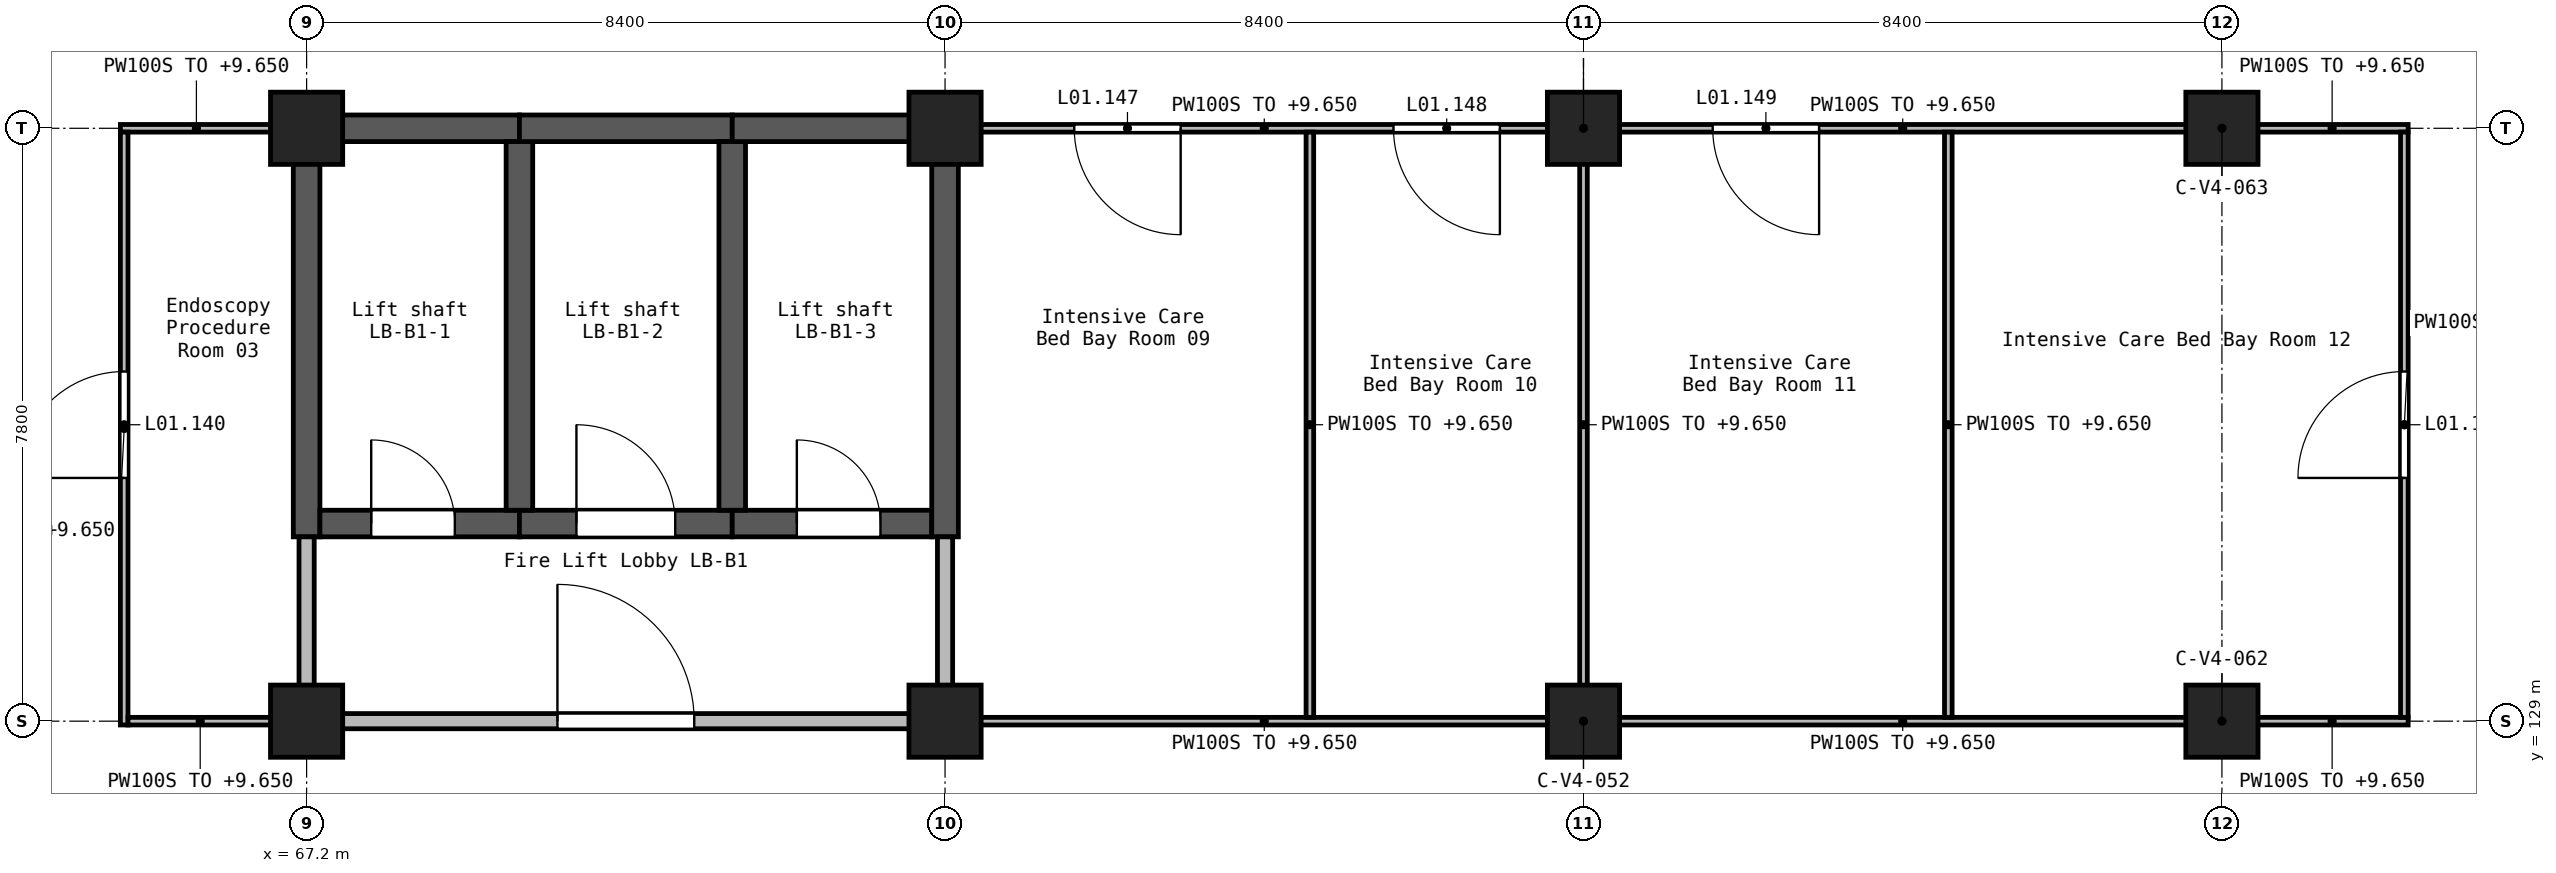
"""IFC4 building model, lengths in metres.
Left out: names, types, materials, properties, quantities, classifications, styles, units other than length and angle.
Written with IfcOpenShell. Run it as: python <this file> out.ifc"""

import sys

from ifc_helpers import new_model, si_unit, direction, frame, frame_2d, origin, origin_2d, place, context, subcontext, project, spatial, rectangle, extrude, element, fill, save


model = new_model("IFC4")
c1 = context("Model", 3, precision=1e-05, world=origin(), true_north=direction((0.0, 1.0)))
c2 = subcontext(c1, "Body", "Model", "MODEL_VIEW")
j1 = project(units=[si_unit("LENGTHUNIT", "METRE"), si_unit("PLANEANGLEUNIT", "RADIAN")], contexts=[c1])
p1 = place(None, origin())
s1 = spatial("IfcSite", under=j1, at=p1, CompositionType="ELEMENT")
p2 = place(p1, origin())
s2 = spatial("IfcBuilding", under=s1, at=p2, CompositionType="ELEMENT")
p3 = place(p2, frame((0.0, 0.0, 5.4)))
s3 = spatial("IfcBuildingStorey", under=s2, at=p3, CompositionType="ELEMENT", Elevation=5.4)
for number, where, z_axis, x_axis in (
    (1, (67.2, 129.0, 0.0), (0.0, 0.0, 1.0), (1.0, 0.0, 0.0)),
    (2, (67.2, 136.8, 0.0), (0.0, 0.0, 1.0), (1.0, 0.0, 0.0)),
    (3, (75.6, 129.0, 0.0), (0.0, 0.0, 1.0), (1.0, 0.0, 0.0)),
    (4, (75.6, 136.8, 0.0), (0.0, 0.0, 1.0), (1.0, 0.0, 0.0)),
    (5, (84.0, 129.0, 0.0), (0.0, 0.0, 1.0), (1.0, 0.0, 0.0)),
    (6, (84.0, 136.8, 0.0), (0.0, 0.0, 1.0), (1.0, 0.0, 0.0)),
    (7, (92.4, 129.0, 0.0), (0.0, 0.0, 1.0), (1.0, 0.0, 0.0)),
    (8, (92.4, 136.8, 0.0), (0.0, 0.0, 1.0), (1.0, 0.0, 0.0)),
):
    element("IfcColumn", number, at=place(p3, frame(where, z_axis=z_axis, x_axis=x_axis)), inside=s3, PredefinedType="COLUMN", context=c2, shape_type="SweptSolid", body=[
        extrude(rectangle(XDim=0.95, YDim=0.95, at=origin_2d()), origin(), (0.0, 0.0, 1.0), 4.5),
    ])
p4 = place(p3, frame((67.025, 136.8, 0.0), z_axis=(0.0, 0.0, 1.0), x_axis=(1.0, 0.0, 0.0)))
e9 = element("IfcWall", 9, at=p4, inside=s3, PredefinedType="SHEAR", context=c2, shape_type="SweptSolid", body=[
    extrude(rectangle(XDim=2.975, YDim=0.35, at=frame_2d((1.488, 0.0))), origin(), (0.0, 0.0, 1.0), 4.5),
])
p5 = place(p3, frame((67.2, 131.425, 0.0), z_axis=(0.0, 0.0, 1.0), x_axis=(0.0, 1.0, 0.0)))
e10 = element("IfcWall", 10, at=p5, inside=s3, PredefinedType="SHEAR", context=c2, shape_type="SweptSolid", body=[
    extrude(rectangle(XDim=5.2, YDim=0.35, at=frame_2d((2.6, 0.0))), origin(), (0.0, 0.0, 1.0), 4.5),
])
p6 = place(p3, frame((67.375, 131.6, 0.0), z_axis=(0.0, 0.0, 1.0), x_axis=(1.0, 0.0, 0.0)))
e11 = element("IfcWall", 11, at=p6, inside=s3, PredefinedType="SHEAR", context=c2, shape_type="SweptSolid", body=[
    extrude(rectangle(XDim=2.625, YDim=0.35, at=frame_2d((1.312, 0.0))), origin(), (0.0, 0.0, 1.0), 4.5),
])
p7 = place(p6, frame((0.675, 0.0, 0.0)))
e12 = element("IfcOpeningElement", 12, at=p7, cuts=e11, PredefinedType="OPENING", context=c2, shape_type="SweptSolid", body=[
    extrude(rectangle(XDim=1.1, YDim=2.1, at=frame_2d((0.55, 1.05))), frame((0.0, 0.185, 0.0), z_axis=(0.0, -1.0, 0.0), x_axis=(1.0, 0.0, 0.0)), (0.0, 0.0, 1.0), 0.37),
])
p8 = place(p3, frame((70.0, 131.6, 0.0), z_axis=(0.0, 0.0, 1.0), x_axis=(1.0, 0.0, 0.0)))
e13 = element("IfcWall", 13, at=p8, inside=s3, PredefinedType="SHEAR", context=c2, shape_type="SweptSolid", body=[
    extrude(rectangle(XDim=2.8, YDim=0.35, at=frame_2d((1.4, 0.0))), origin(), (0.0, 0.0, 1.0), 4.5),
])
p9 = place(p8, frame((0.75, 0.0, 0.0)))
e14 = element("IfcOpeningElement", 14, at=p9, cuts=e13, PredefinedType="OPENING", context=c2, shape_type="SweptSolid", body=[
    extrude(rectangle(XDim=1.3, YDim=2.1, at=frame_2d((0.65, 1.05))), frame((0.0, 0.185, 0.0), z_axis=(0.0, -1.0, 0.0), x_axis=(1.0, 0.0, 0.0)), (0.0, 0.0, 1.0), 0.37),
])
p10 = place(p3, frame((70.0, 131.775, 0.0), z_axis=(0.0, 0.0, 1.0), x_axis=(0.0, 1.0, 0.0)))
e15 = element("IfcWall", 15, at=p10, inside=s3, PredefinedType="SHEAR", context=c2, shape_type="SweptSolid", body=[
    extrude(rectangle(XDim=4.85, YDim=0.35, at=frame_2d((2.425, 0.0))), origin(), (0.0, 0.0, 1.0), 4.5),
])
p11 = place(p3, frame((70.0, 136.8, 0.0), z_axis=(0.0, 0.0, 1.0), x_axis=(1.0, 0.0, 0.0)))
e16 = element("IfcWall", 16, at=p11, inside=s3, PredefinedType="SHEAR", context=c2, shape_type="SweptSolid", body=[
    extrude(rectangle(XDim=2.8, YDim=0.35, at=frame_2d((1.4, 0.0))), origin(), (0.0, 0.0, 1.0), 4.5),
])
p12 = place(p3, frame((72.8, 131.6, 0.0), z_axis=(0.0, 0.0, 1.0), x_axis=(1.0, 0.0, 0.0)))
e17 = element("IfcWall", 17, at=p12, inside=s3, PredefinedType="SHEAR", context=c2, shape_type="SweptSolid", body=[
    extrude(rectangle(XDim=2.625, YDim=0.35, at=frame_2d((1.312, 0.0))), origin(), (0.0, 0.0, 1.0), 4.5),
])
p13 = place(p12, frame((0.85, 0.0, 0.0)))
e18 = element("IfcOpeningElement", 18, at=p13, cuts=e17, PredefinedType="OPENING", context=c2, shape_type="SweptSolid", body=[
    extrude(rectangle(XDim=1.1, YDim=2.1, at=frame_2d((0.55, 1.05))), frame((0.0, 0.185, 0.0), z_axis=(0.0, -1.0, 0.0), x_axis=(1.0, 0.0, 0.0)), (0.0, 0.0, 1.0), 0.37),
])
p14 = place(p3, frame((72.8, 131.775, 0.0), z_axis=(0.0, 0.0, 1.0), x_axis=(0.0, 1.0, 0.0)))
e19 = element("IfcWall", 19, at=p14, inside=s3, PredefinedType="SHEAR", context=c2, shape_type="SweptSolid", body=[
    extrude(rectangle(XDim=4.85, YDim=0.35, at=frame_2d((2.425, 0.0))), origin(), (0.0, 0.0, 1.0), 4.5),
])
p15 = place(p3, frame((72.8, 136.8, 0.0), z_axis=(0.0, 0.0, 1.0), x_axis=(1.0, 0.0, 0.0)))
e20 = element("IfcWall", 20, at=p15, inside=s3, PredefinedType="SHEAR", context=c2, shape_type="SweptSolid", body=[
    extrude(rectangle(XDim=2.625, YDim=0.35, at=frame_2d((1.312, 0.0))), origin(), (0.0, 0.0, 1.0), 4.5),
])
p16 = place(p3, frame((75.6, 131.425, 0.0), z_axis=(0.0, 0.0, 1.0), x_axis=(0.0, 1.0, 0.0)))
e21 = element("IfcWall", 21, at=p16, inside=s3, PredefinedType="SHEAR", context=c2, shape_type="SweptSolid", body=[
    extrude(rectangle(XDim=5.55, YDim=0.35, at=frame_2d((2.775, 0.0))), origin(), (0.0, 0.0, 1.0), 4.5),
])
p17 = place(p3, frame((67.65, 129.0, 0.0), z_axis=(0.0, 0.0, 1.0), x_axis=(1.0, 0.0, 0.0)))
e22 = element("IfcWall", 22, at=p17, inside=s3, PredefinedType="SOLIDWALL", context=c2, shape_type="SweptSolid", body=[
    extrude(rectangle(XDim=7.5, YDim=0.2, at=frame_2d((3.75, 0.0))), origin(), (0.0, 0.0, 1.0), 4.25),
])
p18 = place(p17, frame((2.85, 0.0, 0.0)))
e23 = element("IfcOpeningElement", 23, at=p18, cuts=e22, PredefinedType="OPENING", context=c2, shape_type="SweptSolid", body=[
    extrude(rectangle(XDim=1.8, YDim=2.1, at=frame_2d((0.9, 1.05))), frame((0.0, 0.11, 0.0), z_axis=(0.0, -1.0, 0.0), x_axis=(1.0, 0.0, 0.0)), (0.0, 0.0, 1.0), 0.22),
])
for number, where, z_axis, x_axis in (
    (24, (67.2, 129.45, 0.0), (0.0, 0.0, 1.0), (0.0, 1.0, 0.0)),
    (25, (75.6, 129.45, 0.0), (0.0, 0.0, 1.0), (0.0, 1.0, 0.0)),
):
    element("IfcWall", number, at=place(p3, frame(where, z_axis=z_axis, x_axis=x_axis)), inside=s3, PredefinedType="SOLIDWALL", context=c2, shape_type="SweptSolid", body=[
        extrude(rectangle(XDim=1.975, YDim=0.2, at=frame_2d((0.988, 0.0))), origin(), (0.0, 0.0, 1.0), 4.25),
    ])
p19 = place(p3, frame((94.85, 136.8, 0.0), z_axis=(0.0, 0.0, 1.0), x_axis=(-1.0, 0.0, 0.0)))
e26 = element("IfcWall", 26, at=p19, inside=s3, PredefinedType="PARTITIONING", context=c2, shape_type="SweptSolid", body=[
    extrude(rectangle(XDim=2.0, YDim=0.1, at=frame_2d((1.0, 0.0))), origin(), (0.0, 0.0, 1.0), 4.25),
])
p20 = place(p3, frame((91.95, 136.8, 0.0), z_axis=(0.0, 0.0, 1.0), x_axis=(-1.0, 0.0, 0.0)))
e27 = element("IfcWall", 27, at=p20, inside=s3, PredefinedType="PARTITIONING", context=c2, shape_type="SweptSolid", body=[
    extrude(rectangle(XDim=7.5, YDim=0.1, at=frame_2d((3.75, 0.0))), origin(), (0.0, 0.0, 1.0), 4.25),
])
p21 = place(p20, frame((4.85, 0.0, 0.0)))
e28 = element("IfcOpeningElement", 28, at=p21, cuts=e27, PredefinedType="OPENING", context=c2, shape_type="SweptSolid", body=[
    extrude(rectangle(XDim=1.4, YDim=2.1, at=frame_2d((0.7, 1.05))), frame((0.0, 0.06, 0.0), z_axis=(0.0, -1.0, 0.0), x_axis=(1.0, 0.0, 0.0)), (0.0, 0.0, 1.0), 0.12),
])
p22 = place(p3, frame((83.55, 136.8, 0.0), z_axis=(0.0, 0.0, 1.0), x_axis=(-1.0, 0.0, 0.0)))
e29 = element("IfcWall", 29, at=p22, inside=s3, PredefinedType="PARTITIONING", context=c2, shape_type="SweptSolid", body=[
    extrude(rectangle(XDim=7.5, YDim=0.1, at=frame_2d((3.75, 0.0))), origin(), (0.0, 0.0, 1.0), 4.25),
])
p23 = place(p22, frame((4.85, 0.0, 0.0)))
e30 = element("IfcOpeningElement", 30, at=p23, cuts=e29, PredefinedType="OPENING", context=c2, shape_type="SweptSolid", body=[
    extrude(rectangle(XDim=1.4, YDim=2.1, at=frame_2d((0.7, 1.05))), frame((0.0, 0.06, 0.0), z_axis=(0.0, -1.0, 0.0), x_axis=(1.0, 0.0, 0.0)), (0.0, 0.0, 1.0), 0.12),
])
p24 = place(p22, frame((0.65, 0.0, 0.0)))
e31 = element("IfcOpeningElement", 31, at=p24, cuts=e29, PredefinedType="OPENING", context=c2, shape_type="SweptSolid", body=[
    extrude(rectangle(XDim=1.4, YDim=2.1, at=frame_2d((0.7, 1.05))), frame((0.0, 0.06, 0.0), z_axis=(0.0, -1.0, 0.0), x_axis=(1.0, 0.0, 0.0)), (0.0, 0.0, 1.0), 0.12),
])
for number, where, z_axis, x_axis in (
    (32, (66.75, 136.8, 0.0), (0.0, 0.0, 1.0), (-1.0, 0.0, 0.0)),
    (33, (94.85, 129.0, 0.0), (0.0, 0.0, 1.0), (-1.0, 0.0, 0.0)),
):
    element("IfcWall", number, at=place(p3, frame(where, z_axis=z_axis, x_axis=x_axis)), inside=s3, PredefinedType="PARTITIONING", context=c2, shape_type="SweptSolid", body=[
        extrude(rectangle(XDim=2.0, YDim=0.1, at=frame_2d((1.0, 0.0))), origin(), (0.0, 0.0, 1.0), 4.25),
    ])
for number, where, z_axis, x_axis in (
    (34, (91.95, 129.0, 0.0), (0.0, 0.0, 1.0), (-1.0, 0.0, 0.0)),
    (35, (83.55, 129.0, 0.0), (0.0, 0.0, 1.0), (-1.0, 0.0, 0.0)),
):
    element("IfcWall", number, at=place(p3, frame(where, z_axis=z_axis, x_axis=x_axis)), inside=s3, PredefinedType="PARTITIONING", context=c2, shape_type="SweptSolid", body=[
        extrude(rectangle(XDim=7.5, YDim=0.1, at=frame_2d((3.75, 0.0))), origin(), (0.0, 0.0, 1.0), 4.25),
    ])
p25 = place(p3, frame((64.8, 128.95, 0.0), z_axis=(0.0, 0.0, 1.0), x_axis=(0.0, 1.0, 0.0)))
e36 = element("IfcWall", 36, at=p25, inside=s3, PredefinedType="PARTITIONING", context=c2, shape_type="SweptSolid", body=[
    extrude(rectangle(XDim=7.8, YDim=0.1, at=frame_2d((3.9, 0.0))), origin(), (0.0, 0.0, 1.0), 4.25),
])
p26 = place(p25, frame((3.25, 0.0, 0.0)))
e37 = element("IfcOpeningElement", 37, at=p26, cuts=e36, PredefinedType="OPENING", context=c2, shape_type="SweptSolid", body=[
    extrude(rectangle(XDim=1.4, YDim=2.1, at=frame_2d((0.7, 1.05))), frame((0.0, 0.06, 0.0), z_axis=(0.0, -1.0, 0.0), x_axis=(1.0, 0.0, 0.0)), (0.0, 0.0, 1.0), 0.12),
])
p27 = place(p3, frame((80.4, 129.05, 0.0), z_axis=(0.0, 0.0, 1.0), x_axis=(0.0, 1.0, 0.0)))
e38 = element("IfcWall", 38, at=p27, inside=s3, PredefinedType="PARTITIONING", context=c2, shape_type="SweptSolid", body=[
    extrude(rectangle(XDim=7.7, YDim=0.1, at=frame_2d((3.85, 0.0))), origin(), (0.0, 0.0, 1.0), 4.25),
])
p28 = place(p3, frame((84.0, 129.45, 0.0), z_axis=(0.0, 0.0, 1.0), x_axis=(0.0, 1.0, 0.0)))
e39 = element("IfcWall", 39, at=p28, inside=s3, PredefinedType="PARTITIONING", context=c2, shape_type="SweptSolid", body=[
    extrude(rectangle(XDim=6.9, YDim=0.1, at=frame_2d((3.45, 0.0))), origin(), (0.0, 0.0, 1.0), 4.25),
])
p29 = place(p3, frame((88.8, 129.05, 0.0), z_axis=(0.0, 0.0, 1.0), x_axis=(0.0, 1.0, 0.0)))
e40 = element("IfcWall", 40, at=p29, inside=s3, PredefinedType="PARTITIONING", context=c2, shape_type="SweptSolid", body=[
    extrude(rectangle(XDim=7.7, YDim=0.1, at=frame_2d((3.85, 0.0))), origin(), (0.0, 0.0, 1.0), 4.25),
])
p30 = place(p3, frame((94.8, 129.05, 0.0), z_axis=(0.0, 0.0, 1.0), x_axis=(0.0, 1.0, 0.0)))
e41 = element("IfcWall", 41, at=p30, inside=s3, PredefinedType="PARTITIONING", context=c2, shape_type="SweptSolid", body=[
    extrude(rectangle(XDim=7.7, YDim=0.1, at=frame_2d((3.85, 0.0))), origin(), (0.0, 0.0, 1.0), 4.25),
])
p31 = place(p30, frame((3.15, 0.0, 0.0)))
e42 = element("IfcOpeningElement", 42, at=p31, cuts=e41, PredefinedType="OPENING", context=c2, shape_type="SweptSolid", body=[
    extrude(rectangle(XDim=1.4, YDim=2.1, at=frame_2d((0.7, 1.05))), frame((0.0, 0.06, 0.0), z_axis=(0.0, -1.0, 0.0), x_axis=(1.0, 0.0, 0.0)), (0.0, 0.0, 1.0), 0.12),
])
p32 = place(p3, frame((64.85, 129.0, 0.0), z_axis=(0.0, 0.0, 1.0), x_axis=(1.0, 0.0, 0.0)))
e43 = element("IfcWall", 43, at=p32, inside=s3, PredefinedType="PARTITIONING", context=c2, shape_type="SweptSolid", body=[
    extrude(rectangle(XDim=1.9, YDim=0.1, at=frame_2d((0.95, 0.0))), origin(), (0.0, 0.0, 1.0), 4.25),
])
p33 = place(p18, origin())
e44 = element("IfcDoor", 44, at=p33, inside=s3, OperationType="DOUBLE_DOOR_SINGLE_SWING", PredefinedType="DOOR", context=c2, shape_type="SweptSolid", body=[
    extrude(rectangle(XDim=1.8, YDim=2.1, at=frame_2d((0.9, 1.05))), frame((0.0, 0.025, 0.0), z_axis=(0.0, -1.0, 0.0), x_axis=(1.0, 0.0, 0.0)), (0.0, 0.0, 1.0), 0.05),
])
fill(e23, e44)
p34 = place(p26, frame((1.4, 0.0, 0.0), z_axis=(0.0, 0.0, 1.0), x_axis=(-1.0, 0.0, 0.0)))
e45 = element("IfcDoor", 45, at=p34, inside=s3, OperationType="DOUBLE_DOOR_SINGLE_SWING", PredefinedType="DOOR", context=c2, shape_type="SweptSolid", body=[
    extrude(rectangle(XDim=1.4, YDim=2.1, at=frame_2d((0.7, 1.05))), frame((0.0, 0.025, 0.0), z_axis=(0.0, -1.0, 0.0), x_axis=(1.0, 0.0, 0.0)), (0.0, 0.0, 1.0), 0.05),
])
fill(e37, e45)
p35 = place(p23, origin())
e46 = element("IfcDoor", 46, at=p35, inside=s3, OperationType="DOUBLE_DOOR_SINGLE_SWING", PredefinedType="DOOR", context=c2, shape_type="SweptSolid", body=[
    extrude(rectangle(XDim=1.4, YDim=2.1, at=frame_2d((0.7, 1.05))), frame((0.0, 0.025, 0.0), z_axis=(0.0, -1.0, 0.0), x_axis=(1.0, 0.0, 0.0)), (0.0, 0.0, 1.0), 0.05),
])
fill(e30, e46)
p36 = place(p24, origin())
e47 = element("IfcDoor", 47, at=p36, inside=s3, OperationType="DOUBLE_DOOR_SINGLE_SWING", PredefinedType="DOOR", context=c2, shape_type="SweptSolid", body=[
    extrude(rectangle(XDim=1.4, YDim=2.1, at=frame_2d((0.7, 1.05))), frame((0.0, 0.025, 0.0), z_axis=(0.0, -1.0, 0.0), x_axis=(1.0, 0.0, 0.0)), (0.0, 0.0, 1.0), 0.05),
])
fill(e31, e47)
p37 = place(p21, origin())
e48 = element("IfcDoor", 48, at=p37, inside=s3, OperationType="DOUBLE_DOOR_SINGLE_SWING", PredefinedType="DOOR", context=c2, shape_type="SweptSolid", body=[
    extrude(rectangle(XDim=1.4, YDim=2.1, at=frame_2d((0.7, 1.05))), frame((0.0, 0.025, 0.0), z_axis=(0.0, -1.0, 0.0), x_axis=(1.0, 0.0, 0.0)), (0.0, 0.0, 1.0), 0.05),
])
fill(e28, e48)
p38 = place(p31, origin())
e49 = element("IfcDoor", 49, at=p38, inside=s3, OperationType="DOUBLE_DOOR_SINGLE_SWING", PredefinedType="DOOR", context=c2, shape_type="SweptSolid", body=[
    extrude(rectangle(XDim=1.4, YDim=2.1, at=frame_2d((0.7, 1.05))), frame((0.0, 0.025, 0.0), z_axis=(0.0, -1.0, 0.0), x_axis=(1.0, 0.0, 0.0)), (0.0, 0.0, 1.0), 0.05),
])
fill(e42, e49)
p39 = place(p7, origin())
e50 = element("IfcDoor", 50, at=p39, inside=s3, OperationType="DOUBLE_DOOR_SLIDING", PredefinedType="DOOR", context=c2, shape_type="SweptSolid", body=[
    extrude(rectangle(XDim=1.1, YDim=2.1, at=frame_2d((0.55, 1.05))), frame((0.0, 0.025, 0.0), z_axis=(0.0, -1.0, 0.0), x_axis=(1.0, 0.0, 0.0)), (0.0, 0.0, 1.0), 0.05),
])
fill(e12, e50)
p40 = place(p9, origin())
e51 = element("IfcDoor", 51, at=p40, inside=s3, OperationType="DOUBLE_DOOR_SLIDING", PredefinedType="DOOR", context=c2, shape_type="SweptSolid", body=[
    extrude(rectangle(XDim=1.3, YDim=2.1, at=frame_2d((0.65, 1.05))), frame((0.0, 0.025, 0.0), z_axis=(0.0, -1.0, 0.0), x_axis=(1.0, 0.0, 0.0)), (0.0, 0.0, 1.0), 0.05),
])
fill(e14, e51)
p41 = place(p13, origin())
e52 = element("IfcDoor", 52, at=p41, inside=s3, OperationType="DOUBLE_DOOR_SLIDING", PredefinedType="DOOR", context=c2, shape_type="SweptSolid", body=[
    extrude(rectangle(XDim=1.1, YDim=2.1, at=frame_2d((0.55, 1.05))), frame((0.0, 0.025, 0.0), z_axis=(0.0, -1.0, 0.0), x_axis=(1.0, 0.0, 0.0)), (0.0, 0.0, 1.0), 0.05),
])
fill(e18, e52)
save(model, sys.argv[1])
